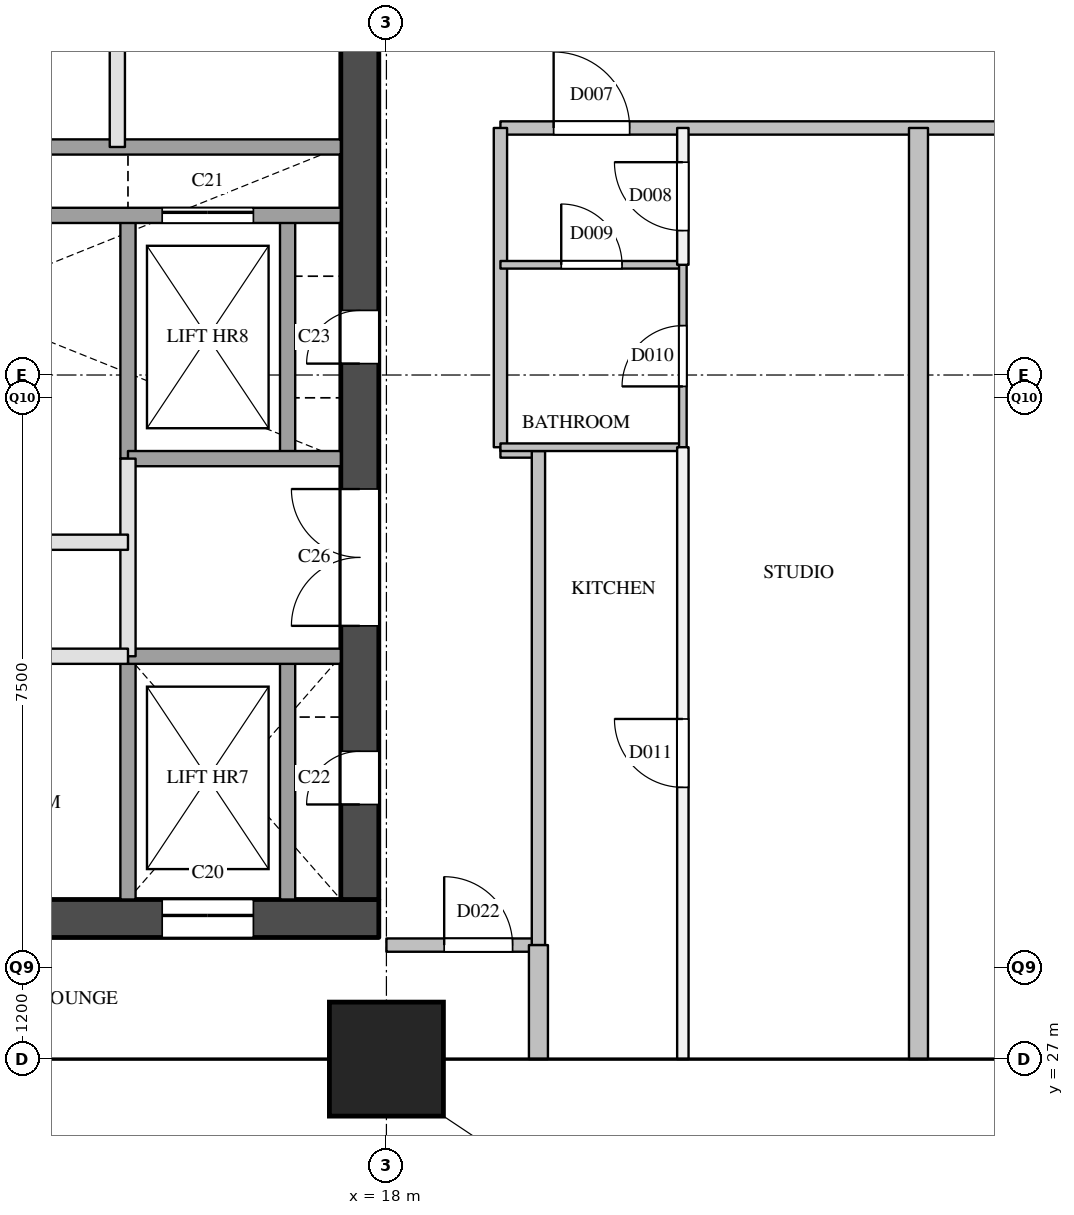
"""IFC4 building model, lengths in metres.
Left out: names, types, materials, properties, quantities, classifications, styles, units other than length and angle.
Written with IfcOpenShell. Run it as: python <this file> out.ifc"""

import sys

from ifc_helpers import new_model, si_unit, direction, frame, frame_2d, origin, origin_2d, place, context, subcontext, project, spatial, rectangle, extrude, element, fill, save


model = new_model("IFC4")
c1 = context("Model", 3, precision=1e-05, world=origin(), true_north=direction((0.0, 1.0)))
c2 = subcontext(c1, "Body", "Model", "MODEL_VIEW")
j1 = project(units=[si_unit("LENGTHUNIT", "METRE"), si_unit("PLANEANGLEUNIT", "RADIAN")], contexts=[c1])
p1 = place(None, origin())
s1 = spatial("IfcSite", under=j1, at=p1, CompositionType="ELEMENT")
p2 = place(p1, origin())
s2 = spatial("IfcBuilding", under=s1, at=p2, CompositionType="ELEMENT")
p3 = place(p2, frame((0.0, 0.0, 142.7)))
s3 = spatial("IfcBuildingStorey", under=s2, at=p3, CompositionType="ELEMENT", Elevation=142.7)
p4 = place(p3, frame((18.0, 27.0, 0.0), z_axis=(0.0, 0.0, 1.0), x_axis=(1.0, 0.0, 0.0)))
e1 = element("IfcColumn", 1, at=p4, inside=s3, PredefinedType="COLUMN", context=c2, shape_type="SweptSolid", body=[
    extrude(rectangle(XDim=1.5, YDim=1.5, at=origin_2d()), origin(), (0.0, 0.0, 1.0), 3.9),
])
p5 = place(p3, frame((5.7, 28.85, 0.0), z_axis=(0.0, 0.0, 1.0), x_axis=(1.0, 0.0, 0.0)))
e2 = element("IfcWall", 2, at=p5, inside=s3, PredefinedType="SHEAR", context=c2, shape_type="SweptSolid", body=[
    extrude(rectangle(XDim=12.2, YDim=0.5, at=frame_2d((6.1, 0.0))), origin(), (0.0, 0.0, 1.0), 3.6),
])
p6 = place(p5, frame((9.35, 0.0, 0.0)))
e3 = element("IfcOpeningElement", 3, at=p6, cuts=e2, PredefinedType="OPENING", context=c2, shape_type="SweptSolid", body=[
    extrude(rectangle(XDim=1.2, YDim=2.1, at=frame_2d((0.6, 1.05))), frame((0.0, 0.26, 0.0), z_axis=(0.0, -1.0, 0.0), x_axis=(1.0, 0.0, 0.0)), (0.0, 0.0, 1.0), 0.52),
])
p7 = place(p3, frame((17.65, 29.1, 0.0), z_axis=(0.0, 0.0, 1.0), x_axis=(0.0, 1.0, 0.0)))
e4 = element("IfcWall", 4, at=p7, inside=s3, PredefinedType="SHEAR", context=c2, shape_type="SweptSolid", body=[
    extrude(rectangle(XDim=20.3, YDim=0.5, at=frame_2d((10.15, 0.0))), origin(), (0.0, 0.0, 1.0), 3.6),
])
p8 = place(p7, frame((1.25, 0.0, 0.0)))
e5 = element("IfcOpeningElement", 5, at=p8, cuts=e4, PredefinedType="OPENING", context=c2, shape_type="SweptSolid", body=[
    extrude(rectangle(XDim=0.7, YDim=2.1, at=frame_2d((0.35, 1.05))), frame((0.0, 0.26, 0.0), z_axis=(0.0, -1.0, 0.0), x_axis=(1.0, 0.0, 0.0)), (0.0, 0.0, 1.0), 0.52),
])
p9 = place(p7, frame((7.05, 0.0, 0.0)))
e6 = element("IfcOpeningElement", 6, at=p9, cuts=e4, PredefinedType="OPENING", context=c2, shape_type="SweptSolid", body=[
    extrude(rectangle(XDim=0.7, YDim=2.1, at=frame_2d((0.35, 1.05))), frame((0.0, 0.26, 0.0), z_axis=(0.0, -1.0, 0.0), x_axis=(1.0, 0.0, 0.0)), (0.0, 0.0, 1.0), 0.52),
])
p10 = place(p7, frame((3.6, 0.0, 0.0)))
e7 = element("IfcOpeningElement", 7, at=p10, cuts=e4, PredefinedType="OPENING", context=c2, shape_type="SweptSolid", body=[
    extrude(rectangle(XDim=1.8, YDim=2.1, at=frame_2d((0.9, 1.05))), frame((0.0, 0.26, 0.0), z_axis=(0.0, -1.0, 0.0), x_axis=(1.0, 0.0, 0.0)), (0.0, 0.0, 1.0), 0.52),
])
p11 = place(p3, frame((14.46, 39.0, 0.0), z_axis=(0.0, 0.0, 1.0), x_axis=(0.0, 1.0, 0.0)))
e8 = element("IfcWall", 8, at=p11, inside=s3, PredefinedType="PARTITIONING", context=c2, shape_type="SweptSolid", body=[
    extrude(rectangle(XDim=6.2, YDim=0.2, at=frame_2d((3.1, 0.0))), origin(), (0.0, 0.0, 1.0), 3.6),
])
p12 = place(p3, frame((14.6, 32.3, 0.0), z_axis=(0.0, 0.0, 1.0), x_axis=(0.0, 1.0, 0.0)))
e9 = element("IfcWall", 9, at=p12, inside=s3, PredefinedType="PARTITIONING", context=c2, shape_type="SweptSolid", body=[
    extrude(rectangle(XDim=2.6, YDim=0.2, at=frame_2d((1.3, 0.0))), origin(), (0.0, 0.0, 1.0), 3.6),
])
p13 = place(p3, frame((14.6, 29.1, 0.0), z_axis=(0.0, 0.0, 1.0), x_axis=(0.0, 1.0, 0.0)))
e10 = element("IfcWall", 10, at=p13, inside=s3, PredefinedType="SOLIDWALL", context=c2, shape_type="SweptSolid", body=[
    extrude(rectangle(XDim=3.2, YDim=0.2, at=frame_2d((1.6, 0.0))), origin(), (0.0, 0.0, 1.0), 3.6),
])
p14 = place(p3, frame((14.6, 34.9, 0.0), z_axis=(0.0, 0.0, 1.0), x_axis=(0.0, 1.0, 0.0)))
e11 = element("IfcWall", 11, at=p14, inside=s3, PredefinedType="SOLIDWALL", context=c2, shape_type="SweptSolid", body=[
    extrude(rectangle(XDim=3.2, YDim=0.2, at=frame_2d((1.6, 0.0))), origin(), (0.0, 0.0, 1.0), 3.6),
])
p15 = place(p3, frame((16.7, 29.1, 0.0), z_axis=(0.0, 0.0, 1.0), x_axis=(0.0, 1.0, 0.0)))
e12 = element("IfcWall", 12, at=p15, inside=s3, PredefinedType="SOLIDWALL", context=c2, shape_type="SweptSolid", body=[
    extrude(rectangle(XDim=3.2, YDim=0.2, at=frame_2d((1.6, 0.0))), origin(), (0.0, 0.0, 1.0), 3.6),
])
p16 = place(p3, frame((16.7, 34.9, 0.0), z_axis=(0.0, 0.0, 1.0), x_axis=(0.0, 1.0, 0.0)))
e13 = element("IfcWall", 13, at=p16, inside=s3, PredefinedType="SOLIDWALL", context=c2, shape_type="SweptSolid", body=[
    extrude(rectangle(XDim=3.2, YDim=0.2, at=frame_2d((1.6, 0.0))), origin(), (0.0, 0.0, 1.0), 3.6),
])
p17 = place(p3, frame((6.2, 32.3, 0.0), z_axis=(0.0, 0.0, 1.0), x_axis=(1.0, 0.0, 0.0)))
e14 = element("IfcWall", 14, at=p17, inside=s3, PredefinedType="PARTITIONING", context=c2, shape_type="SweptSolid", body=[
    extrude(rectangle(XDim=8.4, YDim=0.2, at=frame_2d((4.2, 0.0))), origin(), (0.0, 0.0, 1.0), 3.6),
])
p18 = place(p17, frame((2.07, 0.0, 0.0)))
e15 = element("IfcOpeningElement", 15, at=p18, cuts=e14, PredefinedType="OPENING", context=c2, shape_type="SweptSolid", body=[
    extrude(rectangle(XDim=0.9, YDim=2.1, at=frame_2d((0.45, 1.05))), frame((0.0, 0.11, 0.0), z_axis=(0.0, -1.0, 0.0), x_axis=(1.0, 0.0, 0.0)), (0.0, 0.0, 1.0), 0.22),
])
p19 = place(p17, frame((6.27, 0.0, 0.0)))
e16 = element("IfcOpeningElement", 16, at=p19, cuts=e14, PredefinedType="OPENING", context=c2, shape_type="SweptSolid", body=[
    extrude(rectangle(XDim=0.9, YDim=2.1, at=frame_2d((0.45, 1.05))), frame((0.0, 0.11, 0.0), z_axis=(0.0, -1.0, 0.0), x_axis=(1.0, 0.0, 0.0)), (0.0, 0.0, 1.0), 0.22),
])
p20 = place(p3, frame((14.6, 32.3, 0.0), z_axis=(0.0, 0.0, 1.0), x_axis=(1.0, 0.0, 0.0)))
e17 = element("IfcWall", 17, at=p20, inside=s3, PredefinedType="SOLIDWALL", context=c2, shape_type="SweptSolid", body=[
    extrude(rectangle(XDim=2.8, YDim=0.2, at=frame_2d((1.4, 0.0))), origin(), (0.0, 0.0, 1.0), 3.6),
])
p21 = place(p3, frame((6.2, 33.8, 0.0), z_axis=(0.0, 0.0, 1.0), x_axis=(1.0, 0.0, 0.0)))
e18 = element("IfcWall", 18, at=p21, inside=s3, PredefinedType="PARTITIONING", context=c2, shape_type="SweptSolid", body=[
    extrude(rectangle(XDim=8.4, YDim=0.2, at=frame_2d((4.2, 0.0))), origin(), (0.0, 0.0, 1.0), 3.6),
])
p22 = place(p21, frame((0.81, 0.0, 0.0)))
e19 = element("IfcOpeningElement", 19, at=p22, cuts=e18, PredefinedType="OPENING", context=c2, shape_type="SweptSolid", body=[
    extrude(rectangle(XDim=0.9, YDim=2.1, at=frame_2d((0.45, 1.05))), frame((0.0, 0.11, 0.0), z_axis=(0.0, -1.0, 0.0), x_axis=(1.0, 0.0, 0.0)), (0.0, 0.0, 1.0), 0.22),
])
p23 = place(p21, frame((5.01, 0.0, 0.0)))
e20 = element("IfcOpeningElement", 20, at=p23, cuts=e18, PredefinedType="OPENING", context=c2, shape_type="SweptSolid", body=[
    extrude(rectangle(XDim=0.9, YDim=2.1, at=frame_2d((0.45, 1.05))), frame((0.0, 0.11, 0.0), z_axis=(0.0, -1.0, 0.0), x_axis=(1.0, 0.0, 0.0)), (0.0, 0.0, 1.0), 0.22),
])
p24 = place(p3, frame((14.6, 34.9, 0.0), z_axis=(0.0, 0.0, 1.0), x_axis=(1.0, 0.0, 0.0)))
e21 = element("IfcWall", 21, at=p24, inside=s3, PredefinedType="SOLIDWALL", context=c2, shape_type="SweptSolid", body=[
    extrude(rectangle(XDim=2.8, YDim=0.2, at=frame_2d((1.4, 0.0))), origin(), (0.0, 0.0, 1.0), 3.6),
])
p25 = place(p3, frame((6.2, 38.1, 0.0), z_axis=(0.0, 0.0, 1.0), x_axis=(1.0, 0.0, 0.0)))
e22 = element("IfcWall", 22, at=p25, inside=s3, PredefinedType="SOLIDWALL", context=c2, shape_type="SweptSolid", body=[
    extrude(rectangle(XDim=11.2, YDim=0.2, at=frame_2d((5.6, 0.0))), origin(), (0.0, 0.0, 1.0), 3.6),
])
p26 = place(p25, frame((8.85, 0.0, 0.0)))
e23 = element("IfcOpeningElement", 23, at=p26, cuts=e22, PredefinedType="OPENING", context=c2, shape_type="SweptSolid", body=[
    extrude(rectangle(XDim=1.2, YDim=2.1, at=frame_2d((0.6, 1.05))), frame((0.0, 0.11, 0.0), z_axis=(0.0, -1.0, 0.0), x_axis=(1.0, 0.0, 0.0)), (0.0, 0.0, 1.0), 0.22),
])
p27 = place(p3, frame((12.5, 39.0, 0.0), z_axis=(0.0, 0.0, 1.0), x_axis=(1.0, 0.0, 0.0)))
e24 = element("IfcWall", 24, at=p27, inside=s3, PredefinedType="SOLIDWALL", context=c2, shape_type="SweptSolid", body=[
    extrude(rectangle(XDim=4.9, YDim=0.2, at=frame_2d((2.45, 0.0))), origin(), (0.0, 0.0, 1.0), 3.6),
])
p28 = place(p3, frame((18.0, 28.5, 0.0), z_axis=(0.0, 0.0, 1.0), x_axis=(1.0, 0.0, 0.0)))
e25 = element("IfcWall", 25, at=p28, inside=s3, PredefinedType="PARTITIONING", context=c2, shape_type="SweptSolid", body=[
    extrude(rectangle(XDim=2.0, YDim=0.175, at=frame_2d((1.0, 0.0))), origin(), (0.0, 0.0, 1.0), 3.6),
])
p29 = place(p28, frame((0.76, 0.0, 0.0)))
e26 = element("IfcOpeningElement", 26, at=p29, cuts=e25, PredefinedType="OPENING", context=c2, shape_type="SweptSolid", body=[
    extrude(rectangle(XDim=0.9, YDim=2.1, at=frame_2d((0.45, 1.05))), frame((0.0, 0.097, 0.0), z_axis=(0.0, -1.0, 0.0), x_axis=(1.0, 0.0, 0.0)), (0.0, 0.0, 1.0), 0.195),
])
p30 = place(p3, frame((19.5, 35.0, 0.0), z_axis=(0.0, 0.0, 1.0), x_axis=(1.0, 0.0, 0.0)))
e27 = element("IfcWall", 27, at=p30, inside=s3, PredefinedType="PARTITIONING", context=c2, shape_type="SweptSolid", body=[
    extrude(rectangle(XDim=0.5, YDim=0.175, at=frame_2d((0.25, 0.0))), origin(), (0.0, 0.0, 1.0), 3.6),
])
p31 = place(p3, frame((19.5, 39.25, 0.0), z_axis=(0.0, 0.0, 1.0), x_axis=(1.0, 0.0, 0.0)))
e28 = element("IfcWall", 28, at=p31, inside=s3, PredefinedType="PARTITIONING", context=c2, shape_type="SweptSolid", body=[
    extrude(rectangle(XDim=15.0, YDim=0.175, at=frame_2d((7.5, 0.0))), origin(), (0.0, 0.0, 1.0), 2.6),
])
p32 = place(p31, frame((13.55, 0.0, 0.0)))
e29 = element("IfcOpeningElement", 29, at=p32, cuts=e28, PredefinedType="OPENING", context=c2, shape_type="SweptSolid", body=[
    extrude(rectangle(XDim=1.0, YDim=2.1, at=frame_2d((0.5, 1.05))), frame((0.0, 0.097, 0.0), z_axis=(0.0, -1.0, 0.0), x_axis=(1.0, 0.0, 0.0)), (0.0, 0.0, 1.0), 0.195),
])
p33 = place(p31, frame((0.7, 0.0, 0.0)))
e30 = element("IfcOpeningElement", 30, at=p33, cuts=e28, PredefinedType="OPENING", context=c2, shape_type="SweptSolid", body=[
    extrude(rectangle(XDim=1.0, YDim=2.1, at=frame_2d((0.5, 1.05))), frame((0.0, 0.097, 0.0), z_axis=(0.0, -1.0, 0.0), x_axis=(1.0, 0.0, 0.0)), (0.0, 0.0, 1.0), 0.195),
])
p34 = place(p3, frame((19.5, 35.05, 0.0), z_axis=(0.0, 0.0, 1.0), x_axis=(0.0, 1.0, 0.0)))
e31 = element("IfcWall", 31, at=p34, inside=s3, PredefinedType="PARTITIONING", context=c2, shape_type="SweptSolid", body=[
    extrude(rectangle(XDim=4.2, YDim=0.175, at=frame_2d((2.1, 0.0))), origin(), (0.0, 0.0, 1.0), 3.6),
])
p35 = place(p3, frame((20.0, 28.5, 0.0), z_axis=(0.0, 0.0, 1.0), x_axis=(0.0, 1.0, 0.0)))
e32 = element("IfcWall", 32, at=p35, inside=s3, PredefinedType="PARTITIONING", context=c2, shape_type="SweptSolid", body=[
    extrude(rectangle(XDim=6.5, YDim=0.175, at=frame_2d((3.25, 0.0))), origin(), (0.0, 0.0, 1.0), 3.6),
])
p36 = place(p3, frame((21.9, 27.0, 0.0), z_axis=(0.0, 0.0, 1.0), x_axis=(0.0, 1.0, 0.0)))
e33 = element("IfcWall", 33, at=p36, inside=s3, PredefinedType="PARTITIONING", context=c2, shape_type="SweptSolid", body=[
    extrude(rectangle(XDim=8.05, YDim=0.15, at=frame_2d((4.025, 0.0))), origin(), (0.0, 0.0, 1.0), 2.6),
])
p37 = place(p36, frame((3.575, 0.0, 0.0)))
e34 = element("IfcOpeningElement", 34, at=p37, cuts=e33, PredefinedType="OPENING", context=c2, shape_type="SweptSolid", body=[
    extrude(rectangle(XDim=0.9, YDim=2.1, at=frame_2d((0.45, 1.05))), frame((0.0, 0.085, 0.0), z_axis=(0.0, -1.0, 0.0), x_axis=(1.0, 0.0, 0.0)), (0.0, 0.0, 1.0), 0.17),
])
p38 = place(p3, frame((21.9, 37.45, 0.0), z_axis=(0.0, 0.0, 1.0), x_axis=(0.0, 1.0, 0.0)))
e35 = element("IfcWall", 35, at=p38, inside=s3, PredefinedType="PARTITIONING", context=c2, shape_type="SweptSolid", body=[
    extrude(rectangle(XDim=1.8, YDim=0.15, at=frame_2d((0.9, 0.0))), origin(), (0.0, 0.0, 1.0), 3.6),
])
p39 = place(p38, frame((0.45, 0.0, 0.0)))
e36 = element("IfcOpeningElement", 36, at=p39, cuts=e35, PredefinedType="OPENING", context=c2, shape_type="SweptSolid", body=[
    extrude(rectangle(XDim=0.9, YDim=2.1, at=frame_2d((0.45, 1.05))), frame((0.0, 0.085, 0.0), z_axis=(0.0, -1.0, 0.0), x_axis=(1.0, 0.0, 0.0)), (0.0, 0.0, 1.0), 0.17),
])
p40 = place(p3, frame((20.0, 27.0, 0.0), z_axis=(0.0, 0.0, 1.0), x_axis=(0.0, 1.0, 0.0)))
e37 = element("IfcWall", 37, at=p40, inside=s3, PredefinedType="PARTITIONING", context=c2, shape_type="SweptSolid", body=[
    extrude(rectangle(XDim=1.5, YDim=0.25, at=frame_2d((0.75, 0.0))), origin(), (0.0, 0.0, 1.0), 2.6),
])
p41 = place(p3, frame((25.0, 27.0, 0.0), z_axis=(0.0, 0.0, 1.0), x_axis=(0.0, 1.0, 0.0)))
e38 = element("IfcWall", 38, at=p41, inside=s3, PredefinedType="PARTITIONING", context=c2, shape_type="SweptSolid", body=[
    extrude(rectangle(XDim=12.25, YDim=0.25, at=frame_2d((6.125, 0.0))), origin(), (0.0, 0.0, 1.0), 2.6),
])
p42 = place(p3, frame((19.5, 35.05, 0.0), z_axis=(0.0, 0.0, 1.0), x_axis=(1.0, 0.0, 0.0)))
e39 = element("IfcWall", 39, at=p42, inside=s3, PredefinedType="PARTITIONING", context=c2, shape_type="SweptSolid", body=[
    extrude(rectangle(XDim=2.4, YDim=0.1, at=frame_2d((1.2, 0.0))), origin(), (0.0, 0.0, 1.0), 3.6),
])
p43 = place(p3, frame((19.5, 37.45, 0.0), z_axis=(0.0, 0.0, 1.0), x_axis=(1.0, 0.0, 0.0)))
e40 = element("IfcWall", 40, at=p43, inside=s3, PredefinedType="PARTITIONING", context=c2, shape_type="SweptSolid", body=[
    extrude(rectangle(XDim=2.4, YDim=0.1, at=frame_2d((1.2, 0.0))), origin(), (0.0, 0.0, 1.0), 3.6),
])
p44 = place(p43, frame((0.8, 0.0, 0.0)))
e41 = element("IfcOpeningElement", 41, at=p44, cuts=e40, PredefinedType="OPENING", context=c2, shape_type="SweptSolid", body=[
    extrude(rectangle(XDim=0.8, YDim=2.1, at=frame_2d((0.4, 1.05))), frame((0.0, 0.06, 0.0), z_axis=(0.0, -1.0, 0.0), x_axis=(1.0, 0.0, 0.0)), (0.0, 0.0, 1.0), 0.12),
])
p45 = place(p3, frame((21.9, 35.05, 0.0), z_axis=(0.0, 0.0, 1.0), x_axis=(0.0, 1.0, 0.0)))
e42 = element("IfcWall", 42, at=p45, inside=s3, PredefinedType="PARTITIONING", context=c2, shape_type="SweptSolid", body=[
    extrude(rectangle(XDim=2.4, YDim=0.1, at=frame_2d((1.2, 0.0))), origin(), (0.0, 0.0, 1.0), 3.6),
])
p46 = place(p45, frame((0.8, 0.0, 0.0)))
e43 = element("IfcOpeningElement", 43, at=p46, cuts=e42, PredefinedType="OPENING", context=c2, shape_type="SweptSolid", body=[
    extrude(rectangle(XDim=0.8, YDim=2.1, at=frame_2d((0.4, 1.05))), frame((0.0, 0.06, 0.0), z_axis=(0.0, -1.0, 0.0), x_axis=(1.0, 0.0, 0.0)), (0.0, 0.0, 1.0), 0.12),
])
p47 = place(p6, origin())
e44 = element("IfcDoor", 44, at=p47, inside=s3, OperationType="SLIDING_TO_LEFT", PredefinedType="DOOR", context=c2, shape_type="SweptSolid", body=[
    extrude(rectangle(XDim=1.2, YDim=2.1, at=frame_2d((0.6, 1.05))), frame((0.0, 0.025, 0.0), z_axis=(0.0, -1.0, 0.0), x_axis=(1.0, 0.0, 0.0)), (0.0, 0.0, 1.0), 0.05),
])
fill(e3, e44)
p48 = place(p26, origin())
e45 = element("IfcDoor", 45, at=p48, inside=s3, OperationType="SLIDING_TO_LEFT", PredefinedType="DOOR", context=c2, shape_type="SweptSolid", body=[
    extrude(rectangle(XDim=1.2, YDim=2.1, at=frame_2d((0.6, 1.05))), frame((0.0, 0.025, 0.0), z_axis=(0.0, -1.0, 0.0), x_axis=(1.0, 0.0, 0.0)), (0.0, 0.0, 1.0), 0.05),
])
fill(e23, e45)
p49 = place(p8, origin())
e46 = element("IfcDoor", 46, at=p49, inside=s3, OperationType="SINGLE_SWING_LEFT", PredefinedType="DOOR", context=c2, shape_type="SweptSolid", body=[
    extrude(rectangle(XDim=0.7, YDim=2.1, at=frame_2d((0.35, 1.05))), frame((0.0, 0.025, 0.0), z_axis=(0.0, -1.0, 0.0), x_axis=(1.0, 0.0, 0.0)), (0.0, 0.0, 1.0), 0.05),
])
fill(e5, e46)
p50 = place(p9, origin())
e47 = element("IfcDoor", 47, at=p50, inside=s3, OperationType="SINGLE_SWING_LEFT", PredefinedType="DOOR", context=c2, shape_type="SweptSolid", body=[
    extrude(rectangle(XDim=0.7, YDim=2.1, at=frame_2d((0.35, 1.05))), frame((0.0, 0.025, 0.0), z_axis=(0.0, -1.0, 0.0), x_axis=(1.0, 0.0, 0.0)), (0.0, 0.0, 1.0), 0.05),
])
fill(e6, e47)
p51 = place(p10, origin())
e48 = element("IfcDoor", 48, at=p51, inside=s3, OperationType="DOUBLE_DOOR_SINGLE_SWING", PredefinedType="DOOR", context=c2, shape_type="SweptSolid", body=[
    extrude(rectangle(XDim=1.8, YDim=2.1, at=frame_2d((0.9, 1.05))), frame((0.0, 0.025, 0.0), z_axis=(0.0, -1.0, 0.0), x_axis=(1.0, 0.0, 0.0)), (0.0, 0.0, 1.0), 0.05),
])
fill(e7, e48)
p52 = place(p33, origin())
e49 = element("IfcDoor", 49, at=p52, inside=s3, OperationType="SINGLE_SWING_LEFT", PredefinedType="DOOR", context=c2, shape_type="SweptSolid", body=[
    extrude(rectangle(XDim=1.0, YDim=2.1, at=frame_2d((0.5, 1.05))), frame((0.0, 0.025, 0.0), z_axis=(0.0, -1.0, 0.0), x_axis=(1.0, 0.0, 0.0)), (0.0, 0.0, 1.0), 0.05),
])
fill(e30, e49)
p53 = place(p39, origin())
e50 = element("IfcDoor", 50, at=p53, inside=s3, OperationType="SINGLE_SWING_RIGHT", PredefinedType="DOOR", context=c2, shape_type="SweptSolid", body=[
    extrude(rectangle(XDim=0.9, YDim=2.1, at=frame_2d((0.45, 1.05))), frame((0.0, 0.025, 0.0), z_axis=(0.0, -1.0, 0.0), x_axis=(1.0, 0.0, 0.0)), (0.0, 0.0, 1.0), 0.05),
])
fill(e36, e50)
p54 = place(p44, origin())
e51 = element("IfcDoor", 51, at=p54, inside=s3, OperationType="SINGLE_SWING_LEFT", PredefinedType="DOOR", context=c2, shape_type="SweptSolid", body=[
    extrude(rectangle(XDim=0.8, YDim=2.1, at=frame_2d((0.4, 1.05))), frame((0.0, 0.025, 0.0), z_axis=(0.0, -1.0, 0.0), x_axis=(1.0, 0.0, 0.0)), (0.0, 0.0, 1.0), 0.05),
])
fill(e41, e51)
p55 = place(p46, origin())
e52 = element("IfcDoor", 52, at=p55, inside=s3, OperationType="SINGLE_SWING_LEFT", PredefinedType="DOOR", context=c2, shape_type="SweptSolid", body=[
    extrude(rectangle(XDim=0.8, YDim=2.1, at=frame_2d((0.4, 1.05))), frame((0.0, 0.025, 0.0), z_axis=(0.0, -1.0, 0.0), x_axis=(1.0, 0.0, 0.0)), (0.0, 0.0, 1.0), 0.05),
])
fill(e43, e52)
p56 = place(p37, origin())
e53 = element("IfcDoor", 53, at=p56, inside=s3, OperationType="SINGLE_SWING_RIGHT", PredefinedType="DOOR", context=c2, shape_type="SweptSolid", body=[
    extrude(rectangle(XDim=0.9, YDim=2.1, at=frame_2d((0.45, 1.05))), frame((0.0, 0.025, 0.0), z_axis=(0.0, -1.0, 0.0), x_axis=(1.0, 0.0, 0.0)), (0.0, 0.0, 1.0), 0.05),
])
fill(e34, e53)
p57 = place(p29, origin())
e54 = element("IfcDoor", 54, at=p57, inside=s3, OperationType="SINGLE_SWING_LEFT", PredefinedType="DOOR", context=c2, shape_type="SweptSolid", body=[
    extrude(rectangle(XDim=0.9, YDim=2.1, at=frame_2d((0.45, 1.05))), frame((0.0, 0.025, 0.0), z_axis=(0.0, -1.0, 0.0), x_axis=(1.0, 0.0, 0.0)), (0.0, 0.0, 1.0), 0.05),
])
fill(e26, e54)
save(model, sys.argv[1])
